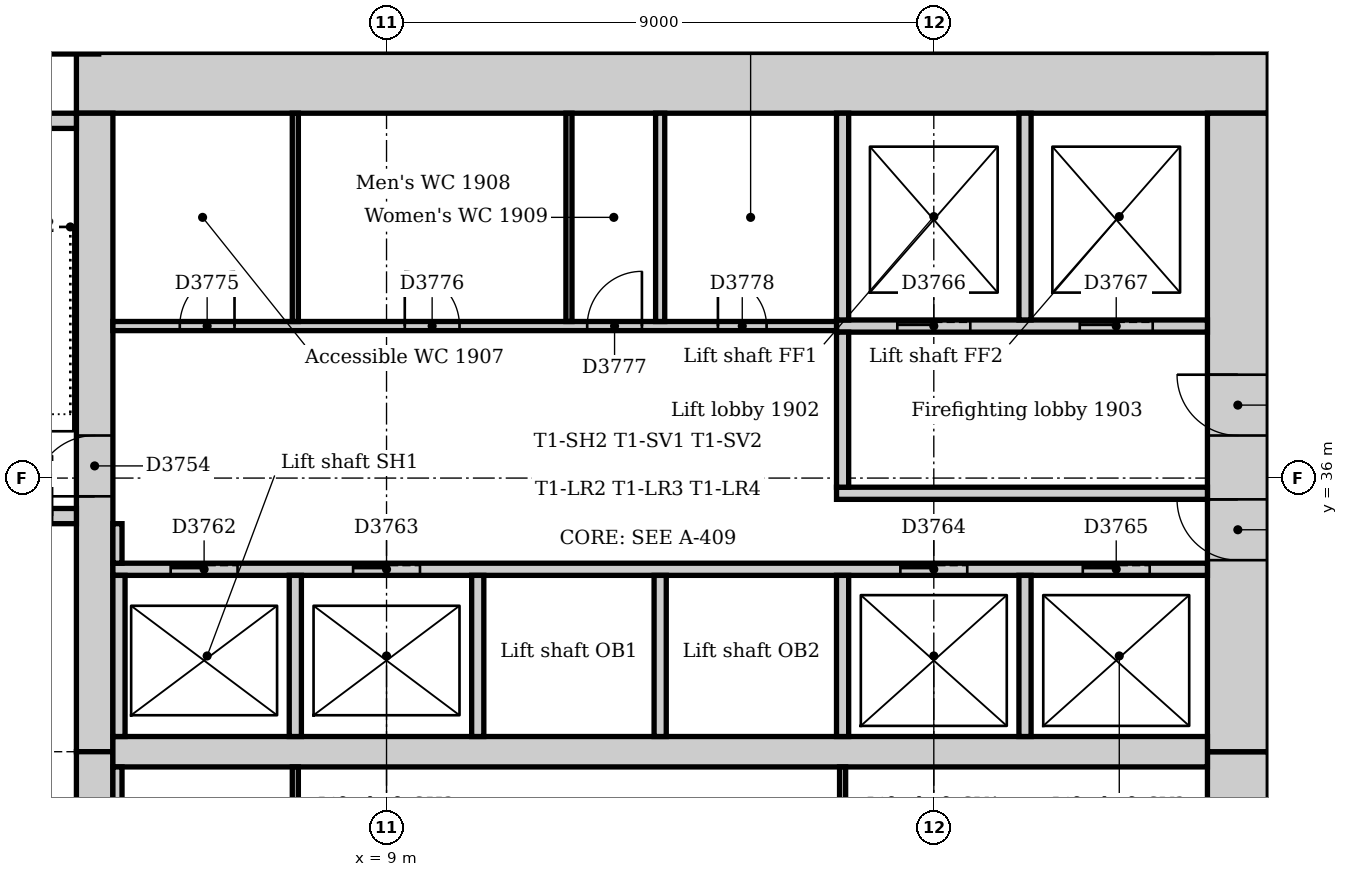
"""IFC4 building model, lengths in metres.
Left out: names, types, materials, properties, quantities, classifications, styles, units other than length and angle.
Written with IfcOpenShell. Run it as: python <this file> out.ifc"""

import sys

from ifc_helpers import new_model, si_unit, direction, frame, frame_2d, origin, origin_2d, place, context, subcontext, project, spatial, rectangle, extrude, element, fill, save


model = new_model("IFC4")
c1 = context("Model", 3, precision=1e-05, world=origin(), true_north=direction((0.0, 1.0)))
c2 = subcontext(c1, "Body", "Model", "MODEL_VIEW")
j1 = project(units=[si_unit("LENGTHUNIT", "METRE"), si_unit("PLANEANGLEUNIT", "RADIAN")], contexts=[c1])
p1 = place(None, origin())
s1 = spatial("IfcSite", under=j1, at=p1, CompositionType="ELEMENT")
p2 = place(p1, origin())
s2 = spatial("IfcBuilding", under=s1, at=p2, CompositionType="ELEMENT")
p3 = place(p2, frame((0.0, 0.0, 83.0)))
s3 = spatial("IfcBuildingStorey", under=s2, at=p3, CompositionType="ELEMENT", Elevation=83.0)
p4 = place(p3, frame((23.5, 42.5, 0.0), z_axis=(0.0, 0.0, 1.0), x_axis=(-1.0, 0.0, 0.0)))
e1 = element("IfcWall", 1, at=p4, inside=s3, PredefinedType="SOLIDWALL", context=c2, shape_type="SweptSolid", body=[
    extrude(rectangle(XDim=19.6, YDim=1.0, at=frame_2d((9.8, 0.0))), origin(), (0.0, 0.0, 1.0), 4.0),
])
p5 = place(p3, frame((23.0, 21.0, 0.0), z_axis=(0.0, 0.0, 1.0), x_axis=(0.0, 1.0, 0.0)))
e2 = element("IfcWall", 2, at=p5, inside=s3, PredefinedType="SOLIDWALL", context=c2, shape_type="SweptSolid", body=[
    extrude(rectangle(XDim=10.5, YDim=1.0, at=frame_2d((5.25, 0.0))), origin(), (0.0, 0.0, 1.0), 4.0),
])
p6 = place(p5, frame((4.35, 0.0, 0.0)))
e3 = element("IfcOpeningElement", 3, at=p6, cuts=e2, PredefinedType="OPENING", context=c2, shape_type="SweptSolid", body=[
    extrude(rectangle(XDim=1.8, YDim=2.1, at=frame_2d((0.9, 1.05))), frame((0.0, 0.51, 0.0), z_axis=(0.0, -1.0, 0.0), x_axis=(1.0, 0.0, 0.0)), (0.0, 0.0, 1.0), 1.02),
])
p7 = place(p3, frame((23.0, 31.5, 0.0), z_axis=(0.0, 0.0, 1.0), x_axis=(0.0, 1.0, 0.0)))
e4 = element("IfcWall", 4, at=p7, inside=s3, PredefinedType="SOLIDWALL", context=c2, shape_type="SweptSolid", body=[
    extrude(rectangle(XDim=10.5, YDim=1.0, at=frame_2d((5.25, 0.0))), origin(), (0.0, 0.0, 1.0), 4.0),
])
p8 = place(p7, frame((3.15, 0.0, 0.0)))
e5 = element("IfcOpeningElement", 5, at=p8, cuts=e4, PredefinedType="OPENING", context=c2, shape_type="SweptSolid", body=[
    extrude(rectangle(XDim=1.0, YDim=2.1, at=frame_2d((0.5, 1.05))), frame((0.0, 0.51, 0.0), z_axis=(0.0, -1.0, 0.0), x_axis=(1.0, 0.0, 0.0)), (0.0, 0.0, 1.0), 1.02),
])
p9 = place(p7, frame((5.2, 0.0, 0.0)))
e6 = element("IfcOpeningElement", 6, at=p9, cuts=e4, PredefinedType="OPENING", context=c2, shape_type="SweptSolid", body=[
    extrude(rectangle(XDim=1.0, YDim=2.1, at=frame_2d((0.5, 1.05))), frame((0.0, 0.51, 0.0), z_axis=(0.0, -1.0, 0.0), x_axis=(1.0, 0.0, 0.0)), (0.0, 0.0, 1.0), 1.02),
])
p10 = place(p3, frame((4.2, 42.0, 0.0), z_axis=(0.0, 0.0, 1.0), x_axis=(0.0, -1.0, 0.0)))
e7 = element("IfcWall", 7, at=p10, inside=s3, PredefinedType="SOLIDWALL", context=c2, shape_type="SweptSolid", body=[
    extrude(rectangle(XDim=10.5, YDim=0.6, at=frame_2d((5.25, 0.0))), origin(), (0.0, 0.0, 1.0), 4.0),
])
p11 = place(p10, frame((5.3, 0.0, 0.0)))
e8 = element("IfcOpeningElement", 8, at=p11, cuts=e7, PredefinedType="OPENING", context=c2, shape_type="SweptSolid", body=[
    extrude(rectangle(XDim=1.0, YDim=2.1, at=frame_2d((0.5, 1.05))), frame((0.0, 0.31, 0.0), z_axis=(0.0, -1.0, 0.0), x_axis=(1.0, 0.0, 0.0)), (0.0, 0.0, 1.0), 0.62),
])
p12 = place(p3, frame((4.2, 31.5, 0.0), z_axis=(0.0, 0.0, 1.0), x_axis=(0.0, -1.0, 0.0)))
e9 = element("IfcWall", 9, at=p12, inside=s3, PredefinedType="SOLIDWALL", context=c2, shape_type="SweptSolid", body=[
    extrude(rectangle(XDim=10.5, YDim=0.6, at=frame_2d((5.25, 0.0))), origin(), (0.0, 0.0, 1.0), 4.0),
])
p13 = place(p12, frame((4.25, 0.0, 0.0)))
e10 = element("IfcOpeningElement", 10, at=p13, cuts=e9, PredefinedType="OPENING", context=c2, shape_type="SweptSolid", body=[
    extrude(rectangle(XDim=1.0, YDim=2.1, at=frame_2d((0.5, 1.05))), frame((0.0, 0.31, 0.0), z_axis=(0.0, -1.0, 0.0), x_axis=(1.0, 0.0, 0.0)), (0.0, 0.0, 1.0), 0.62),
])
p14 = place(p3, frame((4.5, 31.5, 0.0), z_axis=(0.0, 0.0, 1.0), x_axis=(1.0, 0.0, 0.0)))
e11 = element("IfcWall", 11, at=p14, inside=s3, PredefinedType="SOLIDWALL", context=c2, shape_type="SweptSolid", body=[
    extrude(rectangle(XDim=18.0, YDim=0.5, at=frame_2d((9.0, 0.0))), origin(), (0.0, 0.0, 1.0), 4.0),
])
p15 = place(p3, frame((0.36, 35.375, 0.0), z_axis=(0.0, 0.0, 1.0), x_axis=(1.0, 0.0, 0.0)))
e12 = element("IfcWall", 12, at=p15, inside=s3, PredefinedType="SOLIDWALL", context=c2, shape_type="SweptSolid", body=[
    extrude(rectangle(XDim=3.54, YDim=0.25, at=frame_2d((1.77, 0.0))), origin(), (0.0, 0.0, 1.0), 4.0),
])
p16 = place(p15, frame((2.14, 0.0, 0.0)))
e13 = element("IfcOpeningElement", 13, at=p16, cuts=e12, PredefinedType="OPENING", context=c2, shape_type="SweptSolid", body=[
    extrude(rectangle(XDim=1.0, YDim=2.1, at=frame_2d((0.5, 1.05))), frame((0.0, 0.135, 0.0), z_axis=(0.0, -1.0, 0.0), x_axis=(1.0, 0.0, 0.0)), (0.0, 0.0, 1.0), 0.27),
])
p17 = place(p3, frame((3.9, 41.875, 0.0), z_axis=(0.0, 0.0, 1.0), x_axis=(-1.0, 0.0, 0.0)))
e14 = element("IfcWall", 14, at=p17, inside=s3, PredefinedType="SOLIDWALL", context=c2, shape_type="SweptSolid", body=[
    extrude(rectangle(XDim=3.54, YDim=0.25, at=frame_2d((1.77, 0.0))), origin(), (0.0, 0.0, 1.0), 4.0),
])
p18 = place(p3, frame((3.667, 43.574, 0.0), z_axis=(0.0, 0.0, 1.0), x_axis=(1.0, 0.0, 0.0)))
e15 = element("IfcColumn", 15, at=p18, inside=s3, PredefinedType="COLUMN", context=c2, shape_type="SweptSolid", body=[
    extrude(rectangle(XDim=1.2, YDim=1.2, at=origin_2d()), origin(), (0.0, 0.0, 1.0), 3.85),
])
p19 = place(p3, frame((16.4, 35.75, 0.0), z_axis=(0.0, 0.0, 1.0), x_axis=(1.0, 0.0, 0.0)))
e16 = element("IfcWall", 16, at=p19, inside=s3, PredefinedType="PARTITIONING", context=c2, shape_type="SweptSolid", body=[
    extrude(rectangle(XDim=6.1, YDim=0.2, at=frame_2d((3.05, 0.0))), origin(), (0.0, 0.0, 1.0), 3.85),
])
p20 = place(p3, frame((16.4, 38.5, 0.0), z_axis=(0.0, 0.0, 1.0), x_axis=(1.0, 0.0, 0.0)))
e17 = element("IfcWall", 17, at=p20, inside=s3, PredefinedType="PARTITIONING", context=c2, shape_type="SweptSolid", body=[
    extrude(rectangle(XDim=6.1, YDim=0.2, at=frame_2d((3.05, 0.0))), origin(), (0.0, 0.0, 1.0), 3.85),
])
p21 = place(p20, frame((1.0, 0.0, 0.0)))
e18 = element("IfcOpeningElement", 18, at=p21, cuts=e17, PredefinedType="OPENING", context=c2, shape_type="SweptSolid", body=[
    extrude(rectangle(XDim=1.2, YDim=2.1, at=frame_2d((0.6, 1.05))), frame((0.0, 0.11, 0.0), z_axis=(0.0, -1.0, 0.0), x_axis=(1.0, 0.0, 0.0)), (0.0, 0.0, 1.0), 0.22),
])
p22 = place(p20, frame((4.0, 0.0, 0.0)))
e19 = element("IfcOpeningElement", 19, at=p22, cuts=e17, PredefinedType="OPENING", context=c2, shape_type="SweptSolid", body=[
    extrude(rectangle(XDim=1.2, YDim=2.1, at=frame_2d((0.6, 1.05))), frame((0.0, 0.11, 0.0), z_axis=(0.0, -1.0, 0.0), x_axis=(1.0, 0.0, 0.0)), (0.0, 0.0, 1.0), 0.22),
])
p23 = place(p3, frame((16.5, 35.85, 0.0), z_axis=(0.0, 0.0, 1.0), x_axis=(0.0, 1.0, 0.0)))
e20 = element("IfcWall", 20, at=p23, inside=s3, PredefinedType="PARTITIONING", context=c2, shape_type="SweptSolid", body=[
    extrude(rectangle(XDim=2.55, YDim=0.2, at=frame_2d((1.275, 0.0))), origin(), (0.0, 0.0, 1.0), 3.85),
])
p24 = place(p3, frame((4.5, 34.5, 0.0), z_axis=(0.0, 0.0, 1.0), x_axis=(1.0, 0.0, 0.0)))
e21 = element("IfcWall", 21, at=p24, inside=s3, PredefinedType="PARTITIONING", context=c2, shape_type="SweptSolid", body=[
    extrude(rectangle(XDim=18.0, YDim=0.2, at=frame_2d((9.0, 0.0))), origin(), (0.0, 0.0, 1.0), 3.85),
])
p25 = place(p24, frame((0.95, 0.0, 0.0)))
e22 = element("IfcOpeningElement", 22, at=p25, cuts=e21, PredefinedType="OPENING", context=c2, shape_type="SweptSolid", body=[
    extrude(rectangle(XDim=1.1, YDim=2.1, at=frame_2d((0.55, 1.05))), frame((0.0, 0.11, 0.0), z_axis=(0.0, -1.0, 0.0), x_axis=(1.0, 0.0, 0.0)), (0.0, 0.0, 1.0), 0.22),
])
p26 = place(p24, frame((3.95, 0.0, 0.0)))
e23 = element("IfcOpeningElement", 23, at=p26, cuts=e21, PredefinedType="OPENING", context=c2, shape_type="SweptSolid", body=[
    extrude(rectangle(XDim=1.1, YDim=2.1, at=frame_2d((0.55, 1.05))), frame((0.0, 0.11, 0.0), z_axis=(0.0, -1.0, 0.0), x_axis=(1.0, 0.0, 0.0)), (0.0, 0.0, 1.0), 0.22),
])
p27 = place(p24, frame((12.95, 0.0, 0.0)))
e24 = element("IfcOpeningElement", 24, at=p27, cuts=e21, PredefinedType="OPENING", context=c2, shape_type="SweptSolid", body=[
    extrude(rectangle(XDim=1.1, YDim=2.1, at=frame_2d((0.55, 1.05))), frame((0.0, 0.11, 0.0), z_axis=(0.0, -1.0, 0.0), x_axis=(1.0, 0.0, 0.0)), (0.0, 0.0, 1.0), 0.22),
])
p28 = place(p24, frame((15.95, 0.0, 0.0)))
e25 = element("IfcOpeningElement", 25, at=p28, cuts=e21, PredefinedType="OPENING", context=c2, shape_type="SweptSolid", body=[
    extrude(rectangle(XDim=1.1, YDim=2.1, at=frame_2d((0.55, 1.05))), frame((0.0, 0.11, 0.0), z_axis=(0.0, -1.0, 0.0), x_axis=(1.0, 0.0, 0.0)), (0.0, 0.0, 1.0), 0.22),
])
for number, where, z_axis, x_axis in (
    (26, (16.5, 38.6, 0.0), (0.0, 0.0, 1.0), (0.0, 1.0, 0.0)),
    (27, (19.5, 38.6, 0.0), (0.0, 0.0, 1.0), (0.0, 1.0, 0.0)),
):
    element("IfcWall", number, at=place(p3, frame(where, z_axis=z_axis, x_axis=x_axis)), inside=s3, PredefinedType="PARTITIONING", context=c2, shape_type="SweptSolid", body=[
        extrude(rectangle(XDim=3.4, YDim=0.2, at=frame_2d((1.7, 0.0))), origin(), (0.0, 0.0, 1.0), 3.85),
    ])
for number, where, z_axis, x_axis in (
    (28, (4.6, 31.75, 0.0), (0.0, 0.0, 1.0), (0.0, 1.0, 0.0)),
    (29, (7.5, 31.75, 0.0), (0.0, 0.0, 1.0), (0.0, 1.0, 0.0)),
    (30, (10.5, 31.75, 0.0), (0.0, 0.0, 1.0), (0.0, 1.0, 0.0)),
    (31, (13.5, 31.75, 0.0), (0.0, 0.0, 1.0), (0.0, 1.0, 0.0)),
    (32, (16.5, 31.75, 0.0), (0.0, 0.0, 1.0), (0.0, 1.0, 0.0)),
    (33, (19.5, 31.75, 0.0), (0.0, 0.0, 1.0), (0.0, 1.0, 0.0)),
):
    element("IfcWall", number, at=place(p3, frame(where, z_axis=z_axis, x_axis=x_axis)), inside=s3, PredefinedType="PARTITIONING", context=c2, shape_type="SweptSolid", body=[
        extrude(rectangle(XDim=2.65, YDim=0.2, at=frame_2d((1.325, 0.0))), origin(), (0.0, 0.0, 1.0), 3.85),
    ])
p29 = place(p3, frame((4.5, 38.5, 0.0), z_axis=(0.0, 0.0, 1.0), x_axis=(1.0, 0.0, 0.0)))
e34 = element("IfcWall", 34, at=p29, inside=s3, PredefinedType="PARTITIONING", context=c2, shape_type="SweptSolid", body=[
    extrude(rectangle(XDim=11.9, YDim=0.15, at=frame_2d((5.95, 0.0))), origin(), (0.0, 0.0, 1.0), 3.85),
])
p30 = place(p29, frame((1.1, 0.0, 0.0)))
e35 = element("IfcOpeningElement", 35, at=p30, cuts=e34, PredefinedType="OPENING", context=c2, shape_type="SweptSolid", body=[
    extrude(rectangle(XDim=0.9, YDim=2.1, at=frame_2d((0.45, 1.05))), frame((0.0, 0.085, 0.0), z_axis=(0.0, -1.0, 0.0), x_axis=(1.0, 0.0, 0.0)), (0.0, 0.0, 1.0), 0.17),
])
p31 = place(p29, frame((4.8, 0.0, 0.0)))
e36 = element("IfcOpeningElement", 36, at=p31, cuts=e34, PredefinedType="OPENING", context=c2, shape_type="SweptSolid", body=[
    extrude(rectangle(XDim=0.9, YDim=2.1, at=frame_2d((0.45, 1.05))), frame((0.0, 0.085, 0.0), z_axis=(0.0, -1.0, 0.0), x_axis=(1.0, 0.0, 0.0)), (0.0, 0.0, 1.0), 0.17),
])
p32 = place(p29, frame((7.8, 0.0, 0.0)))
e37 = element("IfcOpeningElement", 37, at=p32, cuts=e34, PredefinedType="OPENING", context=c2, shape_type="SweptSolid", body=[
    extrude(rectangle(XDim=0.9, YDim=2.1, at=frame_2d((0.45, 1.05))), frame((0.0, 0.085, 0.0), z_axis=(0.0, -1.0, 0.0), x_axis=(1.0, 0.0, 0.0)), (0.0, 0.0, 1.0), 0.17),
])
p33 = place(p29, frame((9.95, 0.0, 0.0)))
e38 = element("IfcOpeningElement", 38, at=p33, cuts=e34, PredefinedType="OPENING", context=c2, shape_type="SweptSolid", body=[
    extrude(rectangle(XDim=0.8, YDim=2.1, at=frame_2d((0.4, 1.05))), frame((0.0, 0.085, 0.0), z_axis=(0.0, -1.0, 0.0), x_axis=(1.0, 0.0, 0.0)), (0.0, 0.0, 1.0), 0.17),
])
p34 = place(p3, frame((4.575, 28.575, 0.0), z_axis=(0.0, 0.0, 1.0), x_axis=(0.0, 1.0, 0.0)))
e39 = element("IfcWall", 39, at=p34, inside=s3, PredefinedType="PARTITIONING", context=c2, shape_type="SweptSolid", body=[
    extrude(rectangle(XDim=2.675, YDim=0.15, at=frame_2d((1.337, 0.0))), origin(), (0.0, 0.0, 1.0), 3.85),
])
p35 = place(p3, frame((4.575, 34.6, 0.0), z_axis=(0.0, 0.0, 1.0), x_axis=(0.0, 1.0, 0.0)))
e40 = element("IfcWall", 40, at=p35, inside=s3, PredefinedType="PARTITIONING", context=c2, shape_type="SweptSolid", body=[
    extrude(rectangle(XDim=0.65, YDim=0.15, at=frame_2d((0.325, 0.0))), origin(), (0.0, 0.0, 1.0), 3.85),
])
p36 = place(p3, frame((13.5, 38.575, 0.0), z_axis=(0.0, 0.0, 1.0), x_axis=(0.0, 1.0, 0.0)))
e41 = element("IfcWall", 41, at=p36, inside=s3, PredefinedType="PARTITIONING", context=c2, shape_type="SweptSolid", body=[
    extrude(rectangle(XDim=3.425, YDim=0.15, at=frame_2d((1.712, 0.0))), origin(), (0.0, 0.0, 1.0), 3.85),
])
for number, where, z_axis, x_axis in (
    (42, (7.5, 38.575, 0.0), (0.0, 0.0, 1.0), (0.0, 1.0, 0.0)),
    (43, (12.0, 38.575, 0.0), (0.0, 0.0, 1.0), (0.0, 1.0, 0.0)),
):
    element("IfcWall", number, at=place(p3, frame(where, z_axis=z_axis, x_axis=x_axis)), inside=s3, PredefinedType="PARTITIONING", context=c2, shape_type="SweptSolid", body=[
        extrude(rectangle(XDim=3.425, YDim=0.1, at=frame_2d((1.712, 0.0))), origin(), (0.0, 0.0, 1.0), 3.85),
    ])
for number, where, z_axis, x_axis in (
    (44, (7.5, 28.575, 0.0), (0.0, 0.0, 1.0), (0.0, 1.0, 0.0)),
    (45, (16.5, 28.575, 0.0), (0.0, 0.0, 1.0), (0.0, 1.0, 0.0)),
):
    element("IfcWall", number, at=place(p3, frame(where, z_axis=z_axis, x_axis=x_axis)), inside=s3, PredefinedType="PARTITIONING", context=c2, shape_type="SweptSolid", body=[
        extrude(rectangle(XDim=2.675, YDim=0.1, at=frame_2d((1.337, 0.0))), origin(), (0.0, 0.0, 1.0), 3.85),
    ])
p37 = place(p11, frame((1.0, 0.0, 0.0), z_axis=(0.0, 0.0, 1.0), x_axis=(-1.0, 0.0, 0.0)))
e46 = element("IfcDoor", 46, at=p37, inside=s3, OperationType="SINGLE_SWING_LEFT", PredefinedType="DOOR", context=c2, shape_type="SweptSolid", body=[
    extrude(rectangle(XDim=1.0, YDim=2.1, at=frame_2d((0.5, 1.05))), frame((0.0, 0.025, 0.0), z_axis=(0.0, -1.0, 0.0), x_axis=(1.0, 0.0, 0.0)), (0.0, 0.0, 1.0), 0.05),
])
fill(e8, e46)
p38 = place(p25, origin())
e47 = element("IfcDoor", 47, at=p38, inside=s3, OperationType="SLIDING_TO_LEFT", PredefinedType="DOOR", context=c2, shape_type="SweptSolid", body=[
    extrude(rectangle(XDim=1.1, YDim=2.1, at=frame_2d((0.55, 1.05))), frame((0.0, 0.025, 0.0), z_axis=(0.0, -1.0, 0.0), x_axis=(1.0, 0.0, 0.0)), (0.0, 0.0, 1.0), 0.05),
])
fill(e22, e47)
p39 = place(p26, origin())
e48 = element("IfcDoor", 48, at=p39, inside=s3, OperationType="SLIDING_TO_LEFT", PredefinedType="DOOR", context=c2, shape_type="SweptSolid", body=[
    extrude(rectangle(XDim=1.1, YDim=2.1, at=frame_2d((0.55, 1.05))), frame((0.0, 0.025, 0.0), z_axis=(0.0, -1.0, 0.0), x_axis=(1.0, 0.0, 0.0)), (0.0, 0.0, 1.0), 0.05),
])
fill(e23, e48)
p40 = place(p27, origin())
e49 = element("IfcDoor", 49, at=p40, inside=s3, OperationType="SLIDING_TO_LEFT", PredefinedType="DOOR", context=c2, shape_type="SweptSolid", body=[
    extrude(rectangle(XDim=1.1, YDim=2.1, at=frame_2d((0.55, 1.05))), frame((0.0, 0.025, 0.0), z_axis=(0.0, -1.0, 0.0), x_axis=(1.0, 0.0, 0.0)), (0.0, 0.0, 1.0), 0.05),
])
fill(e24, e49)
p41 = place(p28, origin())
e50 = element("IfcDoor", 50, at=p41, inside=s3, OperationType="SLIDING_TO_LEFT", PredefinedType="DOOR", context=c2, shape_type="SweptSolid", body=[
    extrude(rectangle(XDim=1.1, YDim=2.1, at=frame_2d((0.55, 1.05))), frame((0.0, 0.025, 0.0), z_axis=(0.0, -1.0, 0.0), x_axis=(1.0, 0.0, 0.0)), (0.0, 0.0, 1.0), 0.05),
])
fill(e25, e50)
p42 = place(p21, origin())
e51 = element("IfcDoor", 51, at=p42, inside=s3, OperationType="SLIDING_TO_LEFT", PredefinedType="DOOR", context=c2, shape_type="SweptSolid", body=[
    extrude(rectangle(XDim=1.2, YDim=2.1, at=frame_2d((0.6, 1.05))), frame((0.0, 0.025, 0.0), z_axis=(0.0, -1.0, 0.0), x_axis=(1.0, 0.0, 0.0)), (0.0, 0.0, 1.0), 0.05),
])
fill(e18, e51)
p43 = place(p22, origin())
e52 = element("IfcDoor", 52, at=p43, inside=s3, OperationType="SLIDING_TO_LEFT", PredefinedType="DOOR", context=c2, shape_type="SweptSolid", body=[
    extrude(rectangle(XDim=1.2, YDim=2.1, at=frame_2d((0.6, 1.05))), frame((0.0, 0.025, 0.0), z_axis=(0.0, -1.0, 0.0), x_axis=(1.0, 0.0, 0.0)), (0.0, 0.0, 1.0), 0.05),
])
fill(e19, e52)
p44 = place(p8, origin())
e53 = element("IfcDoor", 53, at=p44, inside=s3, OperationType="SINGLE_SWING_RIGHT", PredefinedType="DOOR", context=c2, shape_type="SweptSolid", body=[
    extrude(rectangle(XDim=1.0, YDim=2.1, at=frame_2d((0.5, 1.05))), frame((0.0, 0.025, 0.0), z_axis=(0.0, -1.0, 0.0), x_axis=(1.0, 0.0, 0.0)), (0.0, 0.0, 1.0), 0.05),
])
fill(e5, e53)
p45 = place(p9, origin())
e54 = element("IfcDoor", 54, at=p45, inside=s3, OperationType="SINGLE_SWING_RIGHT", PredefinedType="DOOR", context=c2, shape_type="SweptSolid", body=[
    extrude(rectangle(XDim=1.0, YDim=2.1, at=frame_2d((0.5, 1.05))), frame((0.0, 0.025, 0.0), z_axis=(0.0, -1.0, 0.0), x_axis=(1.0, 0.0, 0.0)), (0.0, 0.0, 1.0), 0.05),
])
fill(e6, e54)
p46 = place(p30, origin())
e55 = element("IfcDoor", 55, at=p46, inside=s3, OperationType="SINGLE_SWING_RIGHT", PredefinedType="DOOR", context=c2, shape_type="SweptSolid", body=[
    extrude(rectangle(XDim=0.9, YDim=2.1, at=frame_2d((0.45, 1.05))), frame((0.0, 0.025, 0.0), z_axis=(0.0, -1.0, 0.0), x_axis=(1.0, 0.0, 0.0)), (0.0, 0.0, 1.0), 0.05),
])
fill(e35, e55)
p47 = place(p31, origin())
e56 = element("IfcDoor", 56, at=p47, inside=s3, OperationType="SINGLE_SWING_LEFT", PredefinedType="DOOR", context=c2, shape_type="SweptSolid", body=[
    extrude(rectangle(XDim=0.9, YDim=2.1, at=frame_2d((0.45, 1.05))), frame((0.0, 0.025, 0.0), z_axis=(0.0, -1.0, 0.0), x_axis=(1.0, 0.0, 0.0)), (0.0, 0.0, 1.0), 0.05),
])
fill(e36, e56)
p48 = place(p32, origin())
e57 = element("IfcDoor", 57, at=p48, inside=s3, OperationType="SINGLE_SWING_RIGHT", PredefinedType="DOOR", context=c2, shape_type="SweptSolid", body=[
    extrude(rectangle(XDim=0.9, YDim=2.1, at=frame_2d((0.45, 1.05))), frame((0.0, 0.025, 0.0), z_axis=(0.0, -1.0, 0.0), x_axis=(1.0, 0.0, 0.0)), (0.0, 0.0, 1.0), 0.05),
])
fill(e37, e57)
p49 = place(p33, origin())
e58 = element("IfcDoor", 58, at=p49, inside=s3, OperationType="SINGLE_SWING_LEFT", PredefinedType="DOOR", context=c2, shape_type="SweptSolid", body=[
    extrude(rectangle(XDim=0.8, YDim=2.1, at=frame_2d((0.4, 1.05))), frame((0.0, 0.025, 0.0), z_axis=(0.0, -1.0, 0.0), x_axis=(1.0, 0.0, 0.0)), (0.0, 0.0, 1.0), 0.05),
])
fill(e38, e58)
save(model, sys.argv[1])
